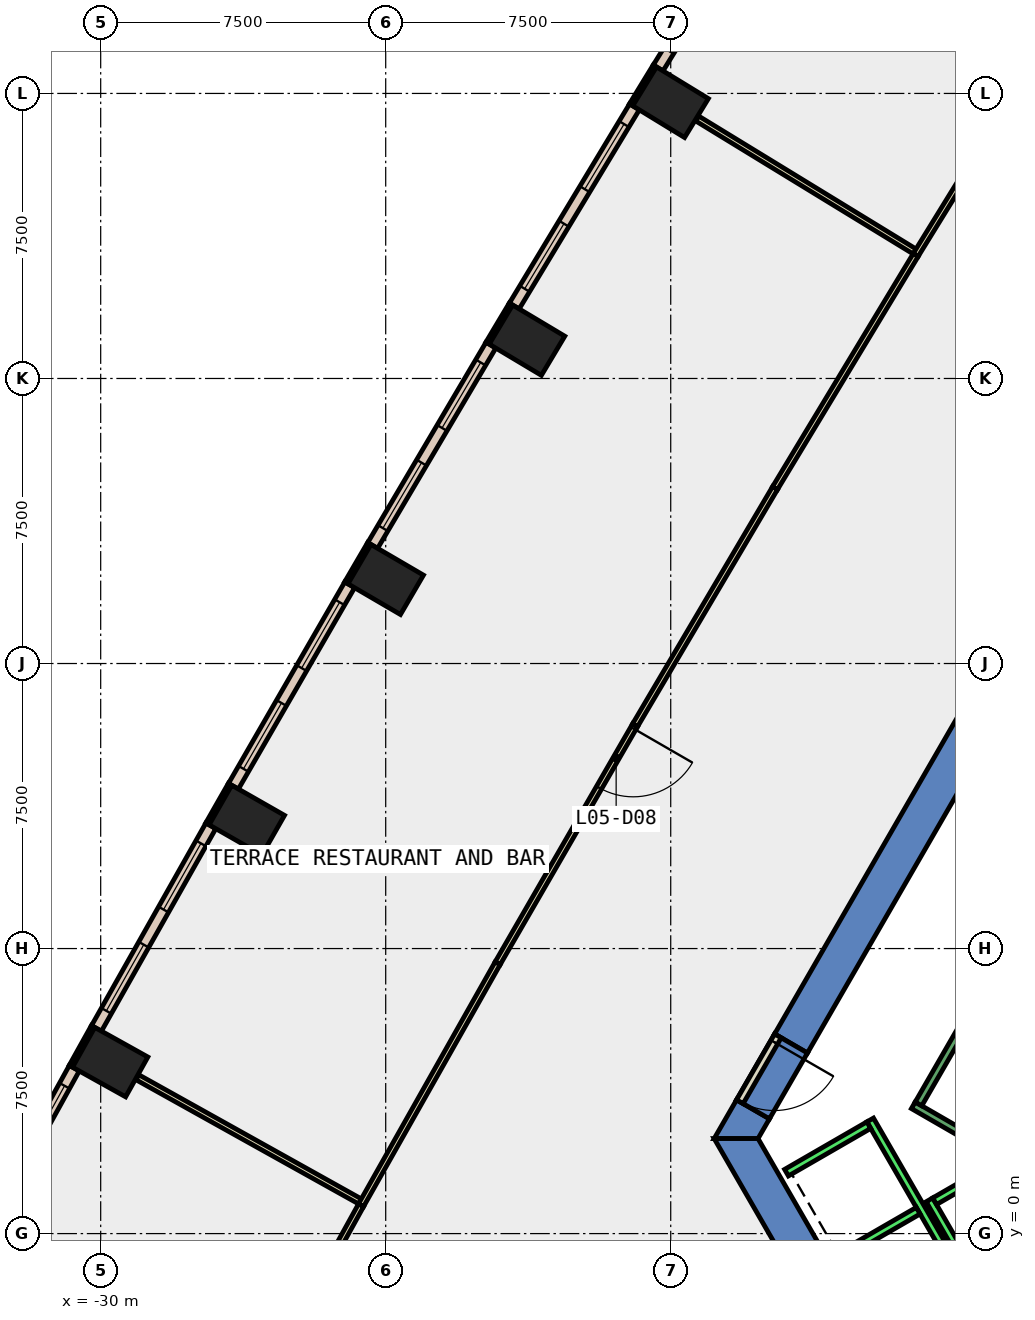
"""IFC4 building model, lengths in metres.
Left out: names, types, materials, properties, quantities, classifications, styles, units other than length and angle.
Written with IfcOpenShell. Run it as: python <this file> out.ifc"""

import sys

from ifc_helpers import new_model, si_unit, direction, frame, frame_2d, origin, origin_2d, place, context, subcontext, project, spatial, polyline, rectangle, outline, extrude, element, fill, save


model = new_model("IFC4")
c1 = context("Model", 3, precision=1e-05, world=origin(), true_north=direction((0.0, 1.0)))
c2 = subcontext(c1, "Body", "Model", "MODEL_VIEW")
j1 = project(units=[si_unit("LENGTHUNIT", "METRE"), si_unit("PLANEANGLEUNIT", "RADIAN")], contexts=[c1])
p1 = place(None, origin())
s1 = spatial("IfcSite", under=j1, at=p1, CompositionType="ELEMENT")
p2 = place(p1, origin())
s2 = spatial("IfcBuilding", under=s1, at=p2, CompositionType="ELEMENT")
p3 = place(p2, frame((0.0, 0.0, 30.0)))
s3 = spatial("IfcBuildingStorey", under=s2, at=p3, CompositionType="ELEMENT", Elevation=30.0)
for number, where, z_axis, x_axis in (
    (1, (-15.005, 29.769, -0.45), (0.0, 0.0, 1.0), (0.522, 0.853, 0.0)),
    (2, (-18.782, 23.508, -0.45), (0.0, 0.0, 1.0), (0.513, 0.858, 0.0)),
    (3, (-22.5, 17.211, -0.45), (0.0, 0.0, 1.0), (0.504, 0.864, 0.0)),
    (4, (-26.155, 10.88, -0.45), (0.0, 0.0, 1.0), (0.496, 0.869, 0.0)),
    (5, (-29.75, 4.512, -0.45), (0.0, 0.0, 1.0), (0.487, 0.873, 0.0)),
):
    element("IfcColumn", number, at=place(p3, frame(where, z_axis=z_axis, x_axis=x_axis)), inside=s3, PredefinedType="COLUMN", context=c2, shape_type="SweptSolid", body=[
        extrude(rectangle(XDim=1.2, YDim=1.6, at=origin_2d()), origin(), (0.0, 0.0, 1.0), 4.85),
    ])
p4 = place(p3, frame((0.0, 0.0, -0.45)))
e6 = element("IfcWall", 6, at=p4, inside=s3, PredefinedType="SHEAR", context=c2, shape_type="SweptSolid", body=[
    extrude(outline(polyline([(-12.267, 5.252), (-11.402, 4.752), (-6.351, 13.5), (-6.928, 14.5), (-12.267, 5.252)])), origin(), (0.0, 0.0, 1.0), 4.85),
])
p5 = place(p3, frame((0.0, 0.0, -0.45)))
e7 = element("IfcWall", 7, at=p5, inside=s3, PredefinedType="SHEAR", context=c2, shape_type="SweptSolid", body=[
    extrude(outline(polyline([(-12.402, 3.02), (-13.267, 3.52), (-13.856, 2.5), (-12.702, 2.5), (-12.402, 3.02)])), origin(), (0.0, 0.0, 1.0), 4.85),
])
p6 = place(p3, frame((0.0, 0.0, 3.6)))
e8 = element("IfcWall", 8, at=p6, inside=s3, PredefinedType="SHEAR", context=c2, shape_type="SweptSolid", body=[
    extrude(outline(polyline([(-13.267, 3.52), (-12.402, 3.02), (-11.402, 4.752), (-12.267, 5.252), (-13.267, 3.52)])), origin(), (0.0, 0.0, 1.0), 0.8),
])
p7 = place(p3, frame((0.0, 0.0, -0.45)))
e9 = element("IfcWall", 9, at=p7, inside=s3, PredefinedType="SHEAR", context=c2, shape_type="SweptSolid", body=[
    extrude(outline(polyline([(-13.856, 2.5), (-6.928, -9.5), (-6.351, -8.5), (-12.702, 2.5), (-13.856, 2.5)])), origin(), (0.0, 0.0, 1.0), 4.85),
])
p8 = place(p3, frame((-15.417, 30.724, 0.0), z_axis=(0.0, 0.0, 1.0), x_axis=(-0.521507599072, -0.853246637327, 0.0)))
e10 = element("IfcWall", 10, at=p8, inside=s3, PredefinedType="STANDARD", context=c2, shape_type="SweptSolid", body=[
    extrude(rectangle(XDim=1.2, YDim=0.1, at=frame_2d((0.6, 0.0))), origin(), (0.0, 0.0, 1.0), 4.4),
])
p9 = place(p3, frame((-19.204, 24.459, 0.0), z_axis=(0.0, 0.0, 1.0), x_axis=(-0.513238760752, -0.858245870635, 0.0)))
e11 = element("IfcWall", 11, at=p9, inside=s3, PredefinedType="STANDARD", context=c2, shape_type="SweptSolid", body=[
    extrude(rectangle(XDim=1.2, YDim=0.1, at=frame_2d((0.6, 0.0))), origin(), (0.0, 0.0, 1.0), 4.4),
])
p10 = place(p3, frame((-22.931, 18.158, 0.0), z_axis=(0.0, 0.0, 1.0), x_axis=(-0.504313844903, -0.863520437418, 0.0)))
e12 = element("IfcWall", 12, at=p10, inside=s3, PredefinedType="STANDARD", context=c2, shape_type="SweptSolid", body=[
    extrude(rectangle(XDim=1.2, YDim=0.1, at=frame_2d((0.6, 0.0))), origin(), (0.0, 0.0, 1.0), 4.4),
])
p11 = place(p3, frame((-26.596, 11.822, 0.0), z_axis=(0.0, 0.0, 1.0), x_axis=(-0.495854054996, -0.868405870629, 0.0)))
e13 = element("IfcWall", 13, at=p11, inside=s3, PredefinedType="STANDARD", context=c2, shape_type="SweptSolid", body=[
    extrude(rectangle(XDim=1.2, YDim=0.1, at=frame_2d((0.6, 0.0))), origin(), (0.0, 0.0, 1.0), 4.4),
])
p12 = place(p3, frame((-30.2, 5.45, 0.0), z_axis=(0.0, 0.0, 1.0), x_axis=(-0.486817526853, -0.873503689488, 0.0)))
e14 = element("IfcWall", 14, at=p12, inside=s3, PredefinedType="STANDARD", context=c2, shape_type="SweptSolid", body=[
    extrude(rectangle(XDim=1.2, YDim=0.1, at=frame_2d((0.6, 0.0))), origin(), (0.0, 0.0, 1.0), 4.4),
])
p13 = place(p3, frame((-12.117, 35.881, 0.0), z_axis=(0.0, 0.0, 1.0), x_axis=(-0.524953701886, -0.85113078365, 0.0)))
e15 = element("IfcWall", 15, at=p13, inside=s3, PredefinedType="STANDARD", context=c2, shape_type="SweptSolid", body=[
    extrude(rectangle(XDim=6.123, YDim=0.3, at=frame_2d((3.061, 0.0))), origin(), (0.0, 0.0, 1.0), 4.4),
])
p14 = place(p13, frame((0.531, 0.0, 1.0)))
e16 = element("IfcOpeningElement", 16, at=p14, cuts=e15, PredefinedType="OPENING", context=c2, shape_type="SweptSolid", body=[
    extrude(rectangle(XDim=2.0, YDim=3.2, at=frame_2d((1.0, 1.6))), frame((0.0, 0.16, 0.0), z_axis=(0.0, -1.0, 0.0), x_axis=(1.0, 0.0, 0.0)), (0.0, 0.0, 1.0), 0.32),
])
p15 = place(p13, frame((3.592, 0.0, 1.0)))
e17 = element("IfcOpeningElement", 17, at=p15, cuts=e15, PredefinedType="OPENING", context=c2, shape_type="SweptSolid", body=[
    extrude(rectangle(XDim=2.0, YDim=3.2, at=frame_2d((1.0, 1.6))), frame((0.0, 0.16, 0.0), z_axis=(0.0, -1.0, 0.0), x_axis=(1.0, 0.0, 0.0)), (0.0, 0.0, 1.0), 0.32),
])
p16 = place(p3, frame((-15.954, 29.647, 0.0), z_axis=(0.0, 0.0, 1.0), x_axis=(-0.516687651362, -0.85617397235, 0.0)))
e18 = element("IfcWall", 18, at=p16, inside=s3, PredefinedType="STANDARD", context=c2, shape_type="SweptSolid", body=[
    extrude(rectangle(XDim=6.121, YDim=0.3, at=frame_2d((3.061, 0.0))), origin(), (0.0, 0.0, 1.0), 4.4),
])
p17 = place(p16, frame((0.53, 0.0, 1.0)))
e19 = element("IfcOpeningElement", 19, at=p17, cuts=e18, PredefinedType="OPENING", context=c2, shape_type="SweptSolid", body=[
    extrude(rectangle(XDim=2.0, YDim=3.2, at=frame_2d((1.0, 1.6))), frame((0.0, 0.16, 0.0), z_axis=(0.0, -1.0, 0.0), x_axis=(1.0, 0.0, 0.0)), (0.0, 0.0, 1.0), 0.32),
])
p18 = place(p16, frame((3.591, 0.0, 1.0)))
e20 = element("IfcOpeningElement", 20, at=p18, cuts=e18, PredefinedType="OPENING", context=c2, shape_type="SweptSolid", body=[
    extrude(rectangle(XDim=2.0, YDim=3.2, at=frame_2d((1.0, 1.6))), frame((0.0, 0.16, 0.0), z_axis=(0.0, -1.0, 0.0), x_axis=(1.0, 0.0, 0.0)), (0.0, 0.0, 1.0), 0.32),
])
p19 = place(p3, frame((-19.731, 23.377, 0.0), z_axis=(0.0, 0.0, 1.0), x_axis=(-0.50834231483, -0.861155091115, 0.0)))
e21 = element("IfcWall", 21, at=p19, inside=s3, PredefinedType="STANDARD", context=c2, shape_type="SweptSolid", body=[
    extrude(rectangle(XDim=6.122, YDim=0.3, at=frame_2d((3.061, 0.0))), origin(), (0.0, 0.0, 1.0), 4.4),
])
p20 = place(p19, frame((0.53, 0.0, 1.0)))
e22 = element("IfcOpeningElement", 22, at=p20, cuts=e21, PredefinedType="OPENING", context=c2, shape_type="SweptSolid", body=[
    extrude(rectangle(XDim=2.0, YDim=3.2, at=frame_2d((1.0, 1.6))), frame((0.0, 0.16, 0.0), z_axis=(0.0, -1.0, 0.0), x_axis=(1.0, 0.0, 0.0)), (0.0, 0.0, 1.0), 0.32),
])
p21 = place(p19, frame((3.591, 0.0, 1.0)))
e23 = element("IfcOpeningElement", 23, at=p21, cuts=e21, PredefinedType="OPENING", context=c2, shape_type="SweptSolid", body=[
    extrude(rectangle(XDim=2.0, YDim=3.2, at=frame_2d((1.0, 1.6))), frame((0.0, 0.16, 0.0), z_axis=(0.0, -1.0, 0.0), x_axis=(1.0, 0.0, 0.0)), (0.0, 0.0, 1.0), 0.32),
])
p22 = place(p3, frame((-23.447, 17.071, 0.0), z_axis=(0.0, 0.0, 1.0), x_axis=(-0.499939977436, -0.866060055055, 0.0)))
e24 = element("IfcWall", 24, at=p22, inside=s3, PredefinedType="STANDARD", context=c2, shape_type="SweptSolid", body=[
    extrude(rectangle(XDim=6.121, YDim=0.3, at=frame_2d((3.061, 0.0))), origin(), (0.0, 0.0, 1.0), 4.4),
])
p23 = place(p22, frame((0.53, 0.0, 1.0)))
e25 = element("IfcOpeningElement", 25, at=p23, cuts=e24, PredefinedType="OPENING", context=c2, shape_type="SweptSolid", body=[
    extrude(rectangle(XDim=2.0, YDim=3.2, at=frame_2d((1.0, 1.6))), frame((0.0, 0.16, 0.0), z_axis=(0.0, -1.0, 0.0), x_axis=(1.0, 0.0, 0.0)), (0.0, 0.0, 1.0), 0.32),
])
p24 = place(p22, frame((3.591, 0.0, 1.0)))
e26 = element("IfcOpeningElement", 26, at=p24, cuts=e24, PredefinedType="OPENING", context=c2, shape_type="SweptSolid", body=[
    extrude(rectangle(XDim=2.0, YDim=3.2, at=frame_2d((1.0, 1.6))), frame((0.0, 0.16, 0.0), z_axis=(0.0, -1.0, 0.0), x_axis=(1.0, 0.0, 0.0)), (0.0, 0.0, 1.0), 0.32),
])
p25 = place(p3, frame((-27.101, 10.73, 0.0), z_axis=(0.0, 0.0, 1.0), x_axis=(-0.491661677717, -0.870786308267, 0.0)))
e27 = element("IfcWall", 27, at=p25, inside=s3, PredefinedType="STANDARD", context=c2, shape_type="SweptSolid", body=[
    extrude(rectangle(XDim=6.122, YDim=0.3, at=frame_2d((3.061, 0.0))), origin(), (0.0, 0.0, 1.0), 4.4),
])
p26 = place(p25, frame((0.531, 0.0, 1.0)))
e28 = element("IfcOpeningElement", 28, at=p26, cuts=e27, PredefinedType="OPENING", context=c2, shape_type="SweptSolid", body=[
    extrude(rectangle(XDim=2.0, YDim=3.2, at=frame_2d((1.0, 1.6))), frame((0.0, 0.16, 0.0), z_axis=(0.0, -1.0, 0.0), x_axis=(1.0, 0.0, 0.0)), (0.0, 0.0, 1.0), 0.32),
])
p27 = place(p25, frame((3.592, 0.0, 1.0)))
e29 = element("IfcOpeningElement", 29, at=p27, cuts=e27, PredefinedType="OPENING", context=c2, shape_type="SweptSolid", body=[
    extrude(rectangle(XDim=2.0, YDim=3.2, at=frame_2d((1.0, 1.6))), frame((0.0, 0.16, 0.0), z_axis=(0.0, -1.0, 0.0), x_axis=(1.0, 0.0, 0.0)), (0.0, 0.0, 1.0), 0.32),
])
p28 = place(p3, frame((-30.694, 4.353, 0.0), z_axis=(0.0, 0.0, 1.0), x_axis=(-0.483233380559, -0.875491576152, 0.0)))
e30 = element("IfcWall", 30, at=p28, inside=s3, PredefinedType="STANDARD", context=c2, shape_type="SweptSolid", body=[
    extrude(rectangle(XDim=6.121, YDim=0.3, at=frame_2d((3.061, 0.0))), origin(), (0.0, 0.0, 1.0), 4.4),
])
p29 = place(p28, frame((0.53, 0.0, 1.0)))
e31 = element("IfcOpeningElement", 31, at=p29, cuts=e30, PredefinedType="OPENING", context=c2, shape_type="SweptSolid", body=[
    extrude(rectangle(XDim=2.0, YDim=3.2, at=frame_2d((1.0, 1.6))), frame((0.0, 0.16, 0.0), z_axis=(0.0, -1.0, 0.0), x_axis=(1.0, 0.0, 0.0)), (0.0, 0.0, 1.0), 0.32),
])
p30 = place(p28, frame((3.591, 0.0, 1.0)))
e32 = element("IfcOpeningElement", 32, at=p30, cuts=e30, PredefinedType="OPENING", context=c2, shape_type="SweptSolid", body=[
    extrude(rectangle(XDim=2.0, YDim=3.2, at=frame_2d((1.0, 1.6))), frame((0.0, 0.16, 0.0), z_axis=(0.0, -1.0, 0.0), x_axis=(1.0, 0.0, 0.0)), (0.0, 0.0, 1.0), 0.32),
])
p31 = place(p3, frame((-8.52, 25.804, 0.0), z_axis=(0.0, 0.0, 1.0), x_axis=(-0.85315809523, 0.521652436535, 0.0)))
e33 = element("IfcWall", 33, at=p31, inside=s3, PredefinedType="PARTITIONING", context=c2, shape_type="SweptSolid", body=[
    extrude(rectangle(XDim=6.781, YDim=0.15, at=frame_2d((3.39, 0.0))), origin(), (0.0, 0.0, 1.0), 4.4),
])
p32 = place(p3, frame((-4.717, 31.973, 0.0), z_axis=(0.0, 0.0, 1.0), x_axis=(-0.524752860455, -0.85125462433, 0.0)))
e34 = element("IfcWall", 34, at=p32, inside=s3, PredefinedType="PARTITIONING", context=c2, shape_type="SweptSolid", body=[
    extrude(rectangle(XDim=7.314, YDim=0.15, at=frame_2d((3.657, 0.0))), origin(), (0.0, 0.0, 1.0), 4.4),
])
p33 = place(p32, frame((0.255, 0.0, 0.0)))
e35 = element("IfcOpeningElement", 35, at=p33, cuts=e34, PredefinedType="OPENING", context=c2, shape_type="SweptSolid", body=[
    extrude(rectangle(XDim=1.8, YDim=2.1, at=frame_2d((0.9, 1.05))), frame((0.0, 0.085, 0.0), z_axis=(0.0, -1.0, 0.0), x_axis=(1.0, 0.0, 0.0)), (0.0, 0.0, 1.0), 0.17),
])
p34 = place(p3, frame((-23.112, 0.811, 0.0), z_axis=(0.0, 0.0, 1.0), x_axis=(-0.873400397497, 0.487002818937, 0.0)))
e36 = element("IfcWall", 36, at=p34, inside=s3, PredefinedType="PARTITIONING", context=c2, shape_type="SweptSolid", body=[
    extrude(rectangle(XDim=6.78, YDim=0.15, at=frame_2d((3.39, 0.0))), origin(), (0.0, 0.0, 1.0), 4.4),
])
p35 = place(p3, frame((-8.554, 25.747, 0.0), z_axis=(0.0, 0.0, 1.0), x_axis=(-0.516784275168, -0.85611565395, 0.0)))
e37 = element("IfcWall", 37, at=p35, inside=s3, PredefinedType="PARTITIONING", context=c2, shape_type="SweptSolid", body=[
    extrude(rectangle(XDim=7.164, YDim=0.15, at=frame_2d((3.582, 0.0))), origin(), (0.0, 0.0, 1.0), 4.4),
])
p36 = place(p3, frame((-12.256, 19.614, 0.0), z_axis=(0.0, 0.0, 1.0), x_axis=(-0.508273674393, -0.861195606073, 0.0)))
e38 = element("IfcWall", 38, at=p36, inside=s3, PredefinedType="PARTITIONING", context=c2, shape_type="SweptSolid", body=[
    extrude(rectangle(XDim=7.24, YDim=0.15, at=frame_2d((3.62, 0.0))), origin(), (0.0, 0.0, 1.0), 4.4),
])
p37 = place(p3, frame((-15.936, 13.379, 0.0), z_axis=(0.0, 0.0, 1.0), x_axis=(-0.500075802435, -0.865981634805, 0.0)))
e39 = element("IfcWall", 39, at=p37, inside=s3, PredefinedType="PARTITIONING", context=c2, shape_type="SweptSolid", body=[
    extrude(rectangle(XDim=7.237, YDim=0.15, at=frame_2d((3.618, 0.0))), origin(), (0.0, 0.0, 1.0), 4.4),
])
p38 = place(p37, frame((0.1, 0.0, 0.0)))
e40 = element("IfcOpeningElement", 40, at=p38, cuts=e39, PredefinedType="OPENING", context=c2, shape_type="SweptSolid", body=[
    extrude(rectangle(XDim=1.8, YDim=2.1, at=frame_2d((0.9, 1.05))), frame((0.0, 0.085, 0.0), z_axis=(0.0, -1.0, 0.0), x_axis=(1.0, 0.0, 0.0)), (0.0, 0.0, 1.0), 0.17),
])
p39 = place(p3, frame((-19.555, 7.112, 0.0), z_axis=(0.0, 0.0, 1.0), x_axis=(-0.491625820386, -0.87080655299, 0.0)))
e41 = element("IfcWall", 41, at=p39, inside=s3, PredefinedType="PARTITIONING", context=c2, shape_type="SweptSolid", body=[
    extrude(rectangle(XDim=7.311, YDim=0.15, at=frame_2d((3.655, 0.0))), origin(), (0.0, 0.0, 1.0), 4.4),
])
p40 = place(p3, frame((-23.148, 0.746, 0.0), z_axis=(0.0, 0.0, 1.0), x_axis=(-0.483125061868, -0.875551354631, 0.0)))
e42 = element("IfcWall", 42, at=p40, inside=s3, PredefinedType="PARTITIONING", context=c2, shape_type="SweptSolid", body=[
    extrude(rectangle(XDim=7.168, YDim=0.15, at=frame_2d((3.584, 0.0))), origin(), (0.0, 0.0, 1.0), 4.4),
])
p41 = place(p3, frame((-12.18, 5.202, 0.0), z_axis=(0.0, 0.0, 1.0), x_axis=(-0.50002537861, -0.866010750942, 0.0)))
e43 = element("IfcWall", 43, at=p41, inside=s3, PredefinedType="PARTITIONING", context=c2, shape_type="SweptSolid", body=[
    extrude(rectangle(XDim=2.0, YDim=0.2, at=frame_2d((1.0, 0.0))), origin(), (0.0, 0.0, 1.0), 2.4),
])
p42 = place(p41, frame((0.19, 0.0, 0.0)))
e44 = element("IfcOpeningElement", 44, at=p42, cuts=e43, PredefinedType="OPENING", context=c2, shape_type="SweptSolid", body=[
    extrude(rectangle(XDim=1.8, YDim=2.1, at=frame_2d((0.9, 1.05))), frame((0.0, 0.11, 0.0), z_axis=(0.0, -1.0, 0.0), x_axis=(1.0, 0.0, 0.0)), (0.0, 0.0, 1.0), 0.22),
])
p43 = place(p3, frame((-8.192, 0.888, 0.0), z_axis=(0.0, 0.0, 1.0), x_axis=(0.49994636267, -0.866056369097, 0.0)))
e45 = element("IfcWall", 45, at=p43, inside=s3, PredefinedType="STANDARD", context=c2, shape_type="SweptSolid", body=[
    extrude(rectangle(XDim=2.8, YDim=0.2, at=frame_2d((1.4, 0.0))), origin(), (0.0, 0.0, 1.0), 4.4),
])
p44 = place(p3, frame((-5.977, 2.052, 0.0), z_axis=(0.0, 0.0, 1.0), x_axis=(-0.865973769406, -0.500089422704, 0.0)))
e46 = element("IfcWall", 46, at=p44, inside=s3, PredefinedType="STANDARD", context=c2, shape_type="SweptSolid", body=[
    extrude(rectangle(XDim=2.399, YDim=0.2, at=frame_2d((1.2, 0.0))), origin(), (0.0, 0.0, 1.0), 4.4),
])
p45 = place(p3, frame((-9.751, 2.99, 0.0), z_axis=(0.0, 0.0, 1.0), x_axis=(0.50000090737, -0.866024879913, 0.0)))
e47 = element("IfcWall", 47, at=p45, inside=s3, PredefinedType="STANDARD", context=c2, shape_type="SweptSolid", body=[
    extrude(rectangle(XDim=10.6, YDim=0.2, at=frame_2d((5.3, 0.0))), origin(), (0.0, 0.0, 1.0), 4.4),
])
p46 = place(p3, frame((-9.788, 2.853, 0.0), z_axis=(0.0, 0.0, 1.0), x_axis=(-0.865998541277, -0.500046524342, 0.0)))
e48 = element("IfcWall", 48, at=p46, inside=s3, PredefinedType="STANDARD", context=c2, shape_type="SweptSolid", body=[
    extrude(rectangle(XDim=2.5, YDim=0.2, at=frame_2d((1.25, 0.0))), origin(), (0.0, 0.0, 1.0), 4.4),
])
p47 = place(p3, frame((-8.488, 0.602, 0.0), z_axis=(0.0, 0.0, 1.0), x_axis=(-0.866022959057, -0.500004234368, 0.0)))
e49 = element("IfcWall", 49, at=p47, inside=s3, PredefinedType="STANDARD", context=c2, shape_type="SweptSolid", body=[
    extrude(rectangle(XDim=2.5, YDim=0.2, at=frame_2d((1.25, 0.0))), origin(), (0.0, 0.0, 1.0), 4.4),
])
p48 = place(p3, frame((-6.25, 2.01, 0.0), z_axis=(0.0, 0.0, 1.0), x_axis=(-0.86611865017, 0.499838457731, 0.0)))
e50 = element("IfcWall", 50, at=p48, inside=s3, PredefinedType="STANDARD", context=c2, shape_type="SweptSolid", body=[
    extrude(rectangle(XDim=2.733, YDim=0.2, at=frame_2d((1.366, 0.0))), origin(), (0.0, 0.0, 1.0), 4.4),
])
p49 = place(p3, frame((-5.03, 9.388, 0.0), z_axis=(0.0, 0.0, 1.0), x_axis=(-0.499978703459, -0.866037698999, 0.0)))
e51 = element("IfcWall", 51, at=p49, inside=s3, PredefinedType="STANDARD", context=c2, shape_type="SweptSolid", body=[
    extrude(rectangle(XDim=6.9, YDim=0.2, at=frame_2d((3.45, 0.0))), origin(), (0.0, 0.0, 1.0), 4.4),
])
p50 = place(p17, origin())
e52 = element("IfcWindow", 52, at=p50, inside=s3, PartitioningType="SINGLE_PANEL", PredefinedType="WINDOW", context=c2, shape_type="SweptSolid", body=[
    extrude(rectangle(XDim=2.0, YDim=3.2, at=frame_2d((1.0, 1.6))), frame((0.0, 0.03, 0.0), z_axis=(0.0, -1.0, 0.0), x_axis=(1.0, 0.0, 0.0)), (0.0, 0.0, 1.0), 0.06),
])
fill(e19, e52)
p51 = place(p18, origin())
e53 = element("IfcWindow", 53, at=p51, inside=s3, PartitioningType="SINGLE_PANEL", PredefinedType="WINDOW", context=c2, shape_type="SweptSolid", body=[
    extrude(rectangle(XDim=2.0, YDim=3.2, at=frame_2d((1.0, 1.6))), frame((0.0, 0.03, 0.0), z_axis=(0.0, -1.0, 0.0), x_axis=(1.0, 0.0, 0.0)), (0.0, 0.0, 1.0), 0.06),
])
fill(e20, e53)
p52 = place(p20, origin())
e54 = element("IfcWindow", 54, at=p52, inside=s3, PartitioningType="SINGLE_PANEL", PredefinedType="WINDOW", context=c2, shape_type="SweptSolid", body=[
    extrude(rectangle(XDim=2.0, YDim=3.2, at=frame_2d((1.0, 1.6))), frame((0.0, 0.03, 0.0), z_axis=(0.0, -1.0, 0.0), x_axis=(1.0, 0.0, 0.0)), (0.0, 0.0, 1.0), 0.06),
])
fill(e22, e54)
p53 = place(p21, origin())
e55 = element("IfcWindow", 55, at=p53, inside=s3, PartitioningType="SINGLE_PANEL", PredefinedType="WINDOW", context=c2, shape_type="SweptSolid", body=[
    extrude(rectangle(XDim=2.0, YDim=3.2, at=frame_2d((1.0, 1.6))), frame((0.0, 0.03, 0.0), z_axis=(0.0, -1.0, 0.0), x_axis=(1.0, 0.0, 0.0)), (0.0, 0.0, 1.0), 0.06),
])
fill(e23, e55)
p54 = place(p23, origin())
e56 = element("IfcWindow", 56, at=p54, inside=s3, PartitioningType="SINGLE_PANEL", PredefinedType="WINDOW", context=c2, shape_type="SweptSolid", body=[
    extrude(rectangle(XDim=2.0, YDim=3.2, at=frame_2d((1.0, 1.6))), frame((0.0, 0.03, 0.0), z_axis=(0.0, -1.0, 0.0), x_axis=(1.0, 0.0, 0.0)), (0.0, 0.0, 1.0), 0.06),
])
fill(e25, e56)
p55 = place(p24, origin())
e57 = element("IfcWindow", 57, at=p55, inside=s3, PartitioningType="SINGLE_PANEL", PredefinedType="WINDOW", context=c2, shape_type="SweptSolid", body=[
    extrude(rectangle(XDim=2.0, YDim=3.2, at=frame_2d((1.0, 1.6))), frame((0.0, 0.03, 0.0), z_axis=(0.0, -1.0, 0.0), x_axis=(1.0, 0.0, 0.0)), (0.0, 0.0, 1.0), 0.06),
])
fill(e26, e57)
p56 = place(p26, origin())
e58 = element("IfcWindow", 58, at=p56, inside=s3, PartitioningType="SINGLE_PANEL", PredefinedType="WINDOW", context=c2, shape_type="SweptSolid", body=[
    extrude(rectangle(XDim=2.0, YDim=3.2, at=frame_2d((1.0, 1.6))), frame((0.0, 0.03, 0.0), z_axis=(0.0, -1.0, 0.0), x_axis=(1.0, 0.0, 0.0)), (0.0, 0.0, 1.0), 0.06),
])
fill(e28, e58)
p57 = place(p27, origin())
e59 = element("IfcWindow", 59, at=p57, inside=s3, PartitioningType="SINGLE_PANEL", PredefinedType="WINDOW", context=c2, shape_type="SweptSolid", body=[
    extrude(rectangle(XDim=2.0, YDim=3.2, at=frame_2d((1.0, 1.6))), frame((0.0, 0.03, 0.0), z_axis=(0.0, -1.0, 0.0), x_axis=(1.0, 0.0, 0.0)), (0.0, 0.0, 1.0), 0.06),
])
fill(e29, e59)
p58 = place(p29, origin())
e60 = element("IfcWindow", 60, at=p58, inside=s3, PartitioningType="SINGLE_PANEL", PredefinedType="WINDOW", context=c2, shape_type="SweptSolid", body=[
    extrude(rectangle(XDim=2.0, YDim=3.2, at=frame_2d((1.0, 1.6))), frame((0.0, 0.03, 0.0), z_axis=(0.0, -1.0, 0.0), x_axis=(1.0, 0.0, 0.0)), (0.0, 0.0, 1.0), 0.06),
])
fill(e31, e60)
p59 = place(p38, origin())
e61 = element("IfcDoor", 61, at=p59, inside=s3, OperationType="DOUBLE_DOOR_SINGLE_SWING", PredefinedType="DOOR", context=c2, shape_type="SweptSolid", body=[
    extrude(rectangle(XDim=1.8, YDim=2.1, at=frame_2d((0.9, 1.05))), frame((0.0, 0.025, 0.0), z_axis=(0.0, -1.0, 0.0), x_axis=(1.0, 0.0, 0.0)), (0.0, 0.0, 1.0), 0.05),
])
fill(e40, e61)
p60 = place(p42, origin())
e62 = element("IfcDoor", 62, at=p60, inside=s3, OperationType="DOUBLE_DOOR_SINGLE_SWING", PredefinedType="DOOR", context=c2, shape_type="SweptSolid", body=[
    extrude(rectangle(XDim=1.8, YDim=2.1, at=frame_2d((0.9, 1.05))), frame((0.0, 0.025, 0.0), z_axis=(0.0, -1.0, 0.0), x_axis=(1.0, 0.0, 0.0)), (0.0, 0.0, 1.0), 0.05),
])
fill(e44, e62)
save(model, sys.argv[1])
